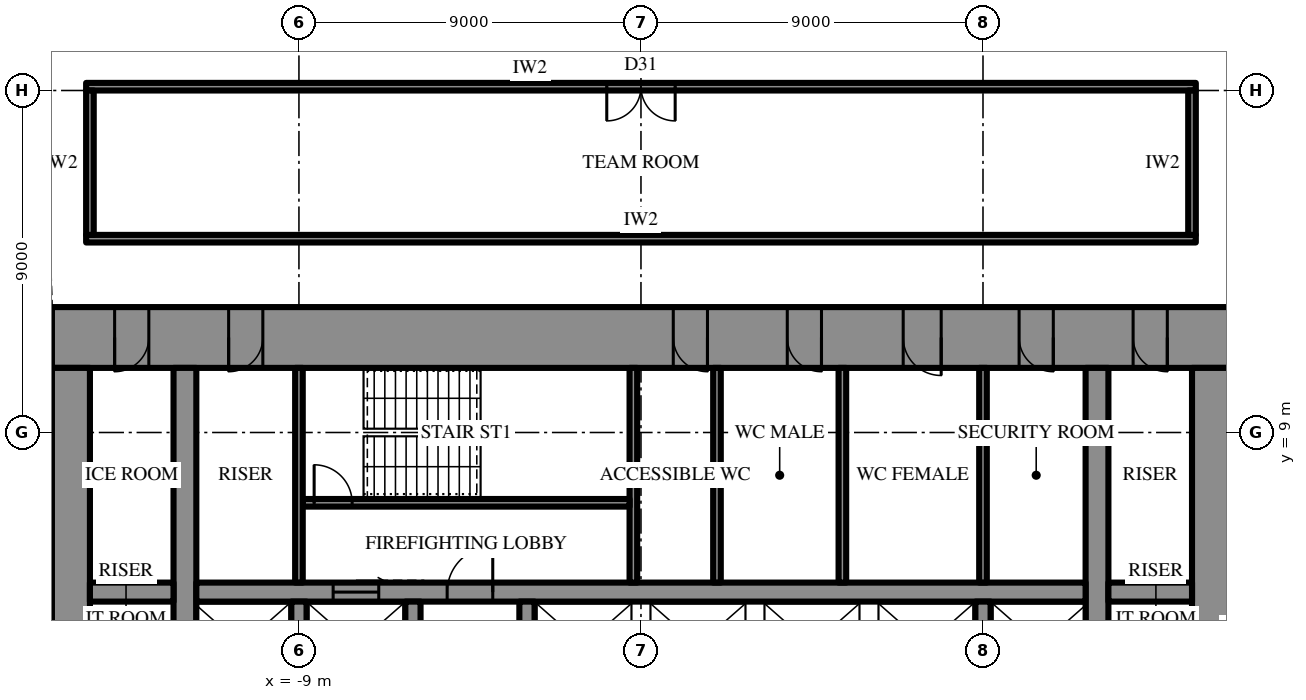
"""IFC4 building model, lengths in metres.
Left out: names, types, materials, properties, quantities, classifications, styles, units other than length and angle.
Written with IfcOpenShell. Run it as: python <this file> out.ifc"""

import sys

from ifc_helpers import new_model, si_unit, direction, frame, frame_2d, origin, place, context, subcontext, project, spatial, rectangle, extrude, element, fill, save


model = new_model("IFC4")
c1 = context("Model", 3, precision=1e-05, world=origin(), true_north=direction((0.0, 1.0)))
c2 = subcontext(c1, "Body", "Model", "MODEL_VIEW")
j1 = project(units=[si_unit("LENGTHUNIT", "METRE"), si_unit("PLANEANGLEUNIT", "RADIAN")], contexts=[c1])
p1 = place(None, origin())
s1 = spatial("IfcSite", under=j1, at=p1, CompositionType="ELEMENT")
p2 = place(p1, origin())
s2 = spatial("IfcBuilding", under=s1, at=p2, CompositionType="ELEMENT")
p3 = place(p2, frame((0.0, 0.0, 282.7)))
s3 = spatial("IfcBuildingStorey", under=s2, at=p3, CompositionType="ELEMENT", Elevation=282.7)
p4 = place(p3, frame((-15.5, 11.5, 0.0), z_axis=(0.0, 0.0, 1.0), x_axis=(1.0, 0.0, 0.0)))
e1 = element("IfcWall", 1, at=p4, inside=s3, PredefinedType="SHEAR", context=c2, shape_type="SweptSolid", body=[
    extrude(rectangle(XDim=31.0, YDim=1.6, at=frame_2d((15.5, 0.0))), origin(), (0.0, 0.0, 1.0), 4.2),
])
p5 = place(p4, frame((16.35, 0.0, 0.0)))
e2 = element("IfcOpeningElement", 2, at=p5, cuts=e1, PredefinedType="OPENING", context=c2, shape_type="SweptSolid", body=[
    extrude(rectangle(XDim=0.9, YDim=2.2, at=frame_2d((0.45, 1.1))), frame((0.0, 0.81, 0.0), z_axis=(0.0, -1.0, 0.0), x_axis=(1.0, 0.0, 0.0)), (0.0, 0.0, 1.0), 1.62),
])
p6 = place(p4, frame((19.35, 0.0, 0.0)))
e3 = element("IfcOpeningElement", 3, at=p6, cuts=e1, PredefinedType="OPENING", context=c2, shape_type="SweptSolid", body=[
    extrude(rectangle(XDim=0.9, YDim=2.2, at=frame_2d((0.45, 1.1))), frame((0.0, 0.81, 0.0), z_axis=(0.0, -1.0, 0.0), x_axis=(1.0, 0.0, 0.0)), (0.0, 0.0, 1.0), 1.62),
])
p7 = place(p4, frame((22.4, 0.0, 0.0)))
e4 = element("IfcOpeningElement", 4, at=p7, cuts=e1, PredefinedType="OPENING", context=c2, shape_type="SweptSolid", body=[
    extrude(rectangle(XDim=1.0, YDim=2.2, at=frame_2d((0.5, 1.1))), frame((0.0, 0.81, 0.0), z_axis=(0.0, -1.0, 0.0), x_axis=(1.0, 0.0, 0.0)), (0.0, 0.0, 1.0), 1.62),
])
p8 = place(p4, frame((1.65, 0.0, 0.0)))
e5 = element("IfcOpeningElement", 5, at=p8, cuts=e1, PredefinedType="OPENING", context=c2, shape_type="SweptSolid", body=[
    extrude(rectangle(XDim=0.9, YDim=2.2, at=frame_2d((0.45, 1.1))), frame((0.0, 0.81, 0.0), z_axis=(0.0, -1.0, 0.0), x_axis=(1.0, 0.0, 0.0)), (0.0, 0.0, 1.0), 1.62),
])
p9 = place(p4, frame((4.65, 0.0, 0.0)))
e6 = element("IfcOpeningElement", 6, at=p9, cuts=e1, PredefinedType="OPENING", context=c2, shape_type="SweptSolid", body=[
    extrude(rectangle(XDim=0.9, YDim=2.2, at=frame_2d((0.45, 1.1))), frame((0.0, 0.81, 0.0), z_axis=(0.0, -1.0, 0.0), x_axis=(1.0, 0.0, 0.0)), (0.0, 0.0, 1.0), 1.62),
])
p10 = place(p4, frame((25.45, 0.0, 0.0)))
e7 = element("IfcOpeningElement", 7, at=p10, cuts=e1, PredefinedType="OPENING", context=c2, shape_type="SweptSolid", body=[
    extrude(rectangle(XDim=0.9, YDim=2.2, at=frame_2d((0.45, 1.1))), frame((0.0, 0.81, 0.0), z_axis=(0.0, -1.0, 0.0), x_axis=(1.0, 0.0, 0.0)), (0.0, 0.0, 1.0), 1.62),
])
p11 = place(p4, frame((28.45, 0.0, 0.0)))
e8 = element("IfcOpeningElement", 8, at=p11, cuts=e1, PredefinedType="OPENING", context=c2, shape_type="SweptSolid", body=[
    extrude(rectangle(XDim=0.9, YDim=2.2, at=frame_2d((0.45, 1.1))), frame((0.0, 0.81, 0.0), z_axis=(0.0, -1.0, 0.0), x_axis=(1.0, 0.0, 0.0)), (0.0, 0.0, 1.0), 1.62),
])
p12 = place(p3, frame((15.0, -10.7, 0.0), z_axis=(0.0, 0.0, 1.0), x_axis=(0.0, 1.0, 0.0)))
e9 = element("IfcWall", 9, at=p12, inside=s3, PredefinedType="SHEAR", context=c2, shape_type="SweptSolid", body=[
    extrude(rectangle(XDim=21.4, YDim=1.0, at=frame_2d((10.7, 0.0))), origin(), (0.0, 0.0, 1.0), 4.2),
])
p13 = place(p12, frame((9.8, 0.0, 0.0)))
e10 = element("IfcOpeningElement", 10, at=p13, cuts=e9, PredefinedType="OPENING", context=c2, shape_type="SweptSolid", body=[
    extrude(rectangle(XDim=1.8, YDim=2.4, at=frame_2d((0.9, 1.2))), frame((0.0, 0.51, 0.0), z_axis=(0.0, -1.0, 0.0), x_axis=(1.0, 0.0, 0.0)), (0.0, 0.0, 1.0), 1.02),
])
p14 = place(p3, frame((-15.0, 10.7, 0.0), z_axis=(0.0, 0.0, 1.0), x_axis=(0.0, -1.0, 0.0)))
e11 = element("IfcWall", 11, at=p14, inside=s3, PredefinedType="SHEAR", context=c2, shape_type="SweptSolid", body=[
    extrude(rectangle(XDim=21.4, YDim=1.0, at=frame_2d((10.7, 0.0))), origin(), (0.0, 0.0, 1.0), 4.2),
])
p15 = place(p14, frame((9.8, 0.0, 0.0)))
e12 = element("IfcOpeningElement", 12, at=p15, cuts=e11, PredefinedType="OPENING", context=c2, shape_type="SweptSolid", body=[
    extrude(rectangle(XDim=1.8, YDim=2.4, at=frame_2d((0.9, 1.2))), frame((0.0, 0.51, 0.0), z_axis=(0.0, -1.0, 0.0), x_axis=(1.0, 0.0, 0.0)), (0.0, 0.0, 1.0), 1.02),
])
p16 = place(p3, frame((12.0, -10.7, 0.0), z_axis=(0.0, 0.0, 1.0), x_axis=(0.0, 1.0, 0.0)))
e13 = element("IfcWall", 13, at=p16, inside=s3, PredefinedType="SHEAR", context=c2, shape_type="SweptSolid", body=[
    extrude(rectangle(XDim=21.4, YDim=0.6, at=frame_2d((10.7, 0.0))), origin(), (0.0, 0.0, 1.0), 4.2),
])
p17 = place(p16, frame((9.8, 0.0, 0.0)))
e14 = element("IfcOpeningElement", 14, at=p17, cuts=e13, PredefinedType="OPENING", context=c2, shape_type="SweptSolid", body=[
    extrude(rectangle(XDim=1.8, YDim=2.4, at=frame_2d((0.9, 1.2))), frame((0.0, 0.31, 0.0), z_axis=(0.0, -1.0, 0.0), x_axis=(1.0, 0.0, 0.0)), (0.0, 0.0, 1.0), 0.62),
])
p18 = place(p3, frame((-12.0, -10.7, 0.0), z_axis=(0.0, 0.0, 1.0), x_axis=(0.0, 1.0, 0.0)))
e15 = element("IfcWall", 15, at=p18, inside=s3, PredefinedType="SHEAR", context=c2, shape_type="SweptSolid", body=[
    extrude(rectangle(XDim=21.4, YDim=0.6, at=frame_2d((10.7, 0.0))), origin(), (0.0, 0.0, 1.0), 4.2),
])
p19 = place(p18, frame((9.8, 0.0, 0.0)))
e16 = element("IfcOpeningElement", 16, at=p19, cuts=e15, PredefinedType="OPENING", context=c2, shape_type="SweptSolid", body=[
    extrude(rectangle(XDim=1.8, YDim=2.4, at=frame_2d((0.9, 1.2))), frame((0.0, 0.31, 0.0), z_axis=(0.0, -1.0, 0.0), x_axis=(1.0, 0.0, 0.0)), (0.0, 0.0, 1.0), 0.62),
])
p20 = place(p3, frame((-14.5, 4.8, 0.0), z_axis=(0.0, 0.0, 1.0), x_axis=(1.0, 0.0, 0.0)))
e17 = element("IfcWall", 17, at=p20, inside=s3, PredefinedType="SHEAR", context=c2, shape_type="SweptSolid", body=[
    extrude(rectangle(XDim=2.2, YDim=0.5, at=frame_2d((1.1, 0.0))), origin(), (0.0, 0.0, 1.0), 4.2),
])
p21 = place(p3, frame((-11.7, 4.8, 0.0), z_axis=(0.0, 0.0, 1.0), x_axis=(1.0, 0.0, 0.0)))
e18 = element("IfcWall", 18, at=p21, inside=s3, PredefinedType="SHEAR", context=c2, shape_type="SweptSolid", body=[
    extrude(rectangle(XDim=23.4, YDim=0.5, at=frame_2d((11.7, 0.0))), origin(), (0.0, 0.0, 1.0), 4.2),
])
p22 = place(p21, frame((6.6, 0.0, 0.0)))
e19 = element("IfcOpeningElement", 19, at=p22, cuts=e18, PredefinedType="OPENING", context=c2, shape_type="SweptSolid", body=[
    extrude(rectangle(XDim=1.2, YDim=2.2, at=frame_2d((0.6, 1.1))), frame((0.0, 0.26, 0.0), z_axis=(0.0, -1.0, 0.0), x_axis=(1.0, 0.0, 0.0)), (0.0, 0.0, 1.0), 0.52),
])
p23 = place(p21, frame((3.6, 0.0, 0.0)))
e20 = element("IfcOpeningElement", 20, at=p23, cuts=e18, PredefinedType="OPENING", context=c2, shape_type="SweptSolid", body=[
    extrude(rectangle(XDim=1.2, YDim=2.2, at=frame_2d((0.6, 1.1))), frame((0.0, 0.26, 0.0), z_axis=(0.0, -1.0, 0.0), x_axis=(1.0, 0.0, 0.0)), (0.0, 0.0, 1.0), 0.52),
])
p24 = place(p3, frame((12.3, 4.8, 0.0), z_axis=(0.0, 0.0, 1.0), x_axis=(1.0, 0.0, 0.0)))
e21 = element("IfcWall", 21, at=p24, inside=s3, PredefinedType="SHEAR", context=c2, shape_type="SweptSolid", body=[
    extrude(rectangle(XDim=2.2, YDim=0.5, at=frame_2d((1.1, 0.0))), origin(), (0.0, 0.0, 1.0), 4.2),
])
for number, where, z_axis, x_axis in (
    (22, (-9.0, 2.25, 0.0), (0.0, 0.0, 1.0), (0.0, 1.0, 0.0)),
    (23, (-6.0, 2.25, 0.0), (0.0, 0.0, 1.0), (0.0, 1.0, 0.0)),
    (24, (-3.0, 2.25, 0.0), (0.0, 0.0, 1.0), (0.0, 1.0, 0.0)),
    (25, (9.0, 2.25, 0.0), (0.0, 0.0, 1.0), (0.0, 1.0, 0.0)),
):
    element("IfcWall", number, at=place(p3, frame(where, z_axis=z_axis, x_axis=x_axis)), inside=s3, PredefinedType="SHEAR", context=c2, shape_type="SweptSolid", body=[
        extrude(rectangle(XDim=2.3, YDim=0.4, at=frame_2d((1.15, 0.0))), origin(), (0.0, 0.0, 1.0), 4.2),
    ])
p25 = place(p3, frame((-0.2, 5.05, 0.0), z_axis=(0.0, 0.0, 1.0), x_axis=(0.0, 1.0, 0.0)))
e26 = element("IfcWall", 26, at=p25, inside=s3, PredefinedType="SHEAR", context=c2, shape_type="SweptSolid", body=[
    extrude(rectangle(XDim=5.65, YDim=0.2, at=frame_2d((2.825, 0.0))), origin(), (0.0, 0.0, 1.0), 4.2),
])
p26 = place(p3, frame((-8.9, 7.15, 0.0), z_axis=(0.0, 0.0, 1.0), x_axis=(1.0, 0.0, 0.0)))
e27 = element("IfcWall", 27, at=p26, inside=s3, PredefinedType="SHEAR", context=c2, shape_type="SweptSolid", body=[
    extrude(rectangle(XDim=8.6, YDim=0.2, at=frame_2d((4.3, 0.0))), origin(), (0.0, 0.0, 1.0), 4.2),
])
p27 = place(p26, frame((0.3, 0.0, 0.0)))
e28 = element("IfcOpeningElement", 28, at=p27, cuts=e27, PredefinedType="OPENING", context=c2, shape_type="SweptSolid", body=[
    extrude(rectangle(XDim=1.0, YDim=2.2, at=frame_2d((0.5, 1.1))), frame((0.0, 0.11, 0.0), z_axis=(0.0, -1.0, 0.0), x_axis=(1.0, 0.0, 0.0)), (0.0, 0.0, 1.0), 0.22),
])
for number, where, z_axis, x_axis in (
    (29, (-9.0, 5.05, 0.0), (0.0, 0.0, 1.0), (0.0, 1.0, 0.0)),
    (30, (9.0, 5.05, 0.0), (0.0, 0.0, 1.0), (0.0, 1.0, 0.0)),
    (31, (2.0, 5.05, 0.0), (0.0, 0.0, 1.0), (0.0, 1.0, 0.0)),
    (32, (5.3, 5.05, 0.0), (0.0, 0.0, 1.0), (0.0, 1.0, 0.0)),
):
    element("IfcWall", number, at=place(p3, frame(where, z_axis=z_axis, x_axis=x_axis)), inside=s3, PredefinedType="PARTITIONING", context=c2, shape_type="SweptSolid", body=[
        extrude(rectangle(XDim=5.65, YDim=0.2, at=frame_2d((2.825, 0.0))), origin(), (0.0, 0.0, 1.0), 4.0),
    ])
p28 = place(p3, frame((-14.6, 14.1, 0.0), z_axis=(0.0, 0.0, 1.0), x_axis=(1.0, 0.0, 0.0)))
e33 = element("IfcWall", 33, at=p28, inside=s3, PredefinedType="PARTITIONING", context=c2, shape_type="SweptSolid", body=[
    extrude(rectangle(XDim=29.2, YDim=0.2, at=frame_2d((14.6, 0.0))), origin(), (0.0, 0.0, 1.0), 4.0),
])
p29 = place(p3, frame((-14.6, 18.1, 0.0), z_axis=(0.0, 0.0, 1.0), x_axis=(1.0, 0.0, 0.0)))
e34 = element("IfcWall", 34, at=p29, inside=s3, PredefinedType="PARTITIONING", context=c2, shape_type="SweptSolid", body=[
    extrude(rectangle(XDim=29.2, YDim=0.2, at=frame_2d((14.6, 0.0))), origin(), (0.0, 0.0, 1.0), 4.0),
])
p30 = place(p29, frame((13.7, 0.0, 0.0)))
e35 = element("IfcOpeningElement", 35, at=p30, cuts=e34, PredefinedType="OPENING", context=c2, shape_type="SweptSolid", body=[
    extrude(rectangle(XDim=1.8, YDim=2.4, at=frame_2d((0.9, 1.2))), frame((0.0, 0.11, 0.0), z_axis=(0.0, -1.0, 0.0), x_axis=(1.0, 0.0, 0.0)), (0.0, 0.0, 1.0), 0.22),
])
for number, where, z_axis, x_axis in (
    (36, (-14.5, 14.2, 0.0), (0.0, 0.0, 1.0), (0.0, 1.0, 0.0)),
    (37, (14.5, 14.2, 0.0), (0.0, 0.0, 1.0), (0.0, 1.0, 0.0)),
):
    element("IfcWall", number, at=place(p3, frame(where, z_axis=z_axis, x_axis=x_axis)), inside=s3, PredefinedType="PARTITIONING", context=c2, shape_type="SweptSolid", body=[
        extrude(rectangle(XDim=3.8, YDim=0.2, at=frame_2d((1.9, 0.0))), origin(), (0.0, 0.0, 1.0), 4.0),
    ])
p31 = place(p22, origin())
e38 = element("IfcDoor", 38, at=p31, inside=s3, OperationType="SINGLE_SWING_LEFT", PredefinedType="DOOR", context=c2, shape_type="SweptSolid", body=[
    extrude(rectangle(XDim=1.2, YDim=2.2, at=frame_2d((0.6, 1.1))), frame((0.0, 0.025, 0.0), z_axis=(0.0, -1.0, 0.0), x_axis=(1.0, 0.0, 0.0)), (0.0, 0.0, 1.0), 0.05),
])
fill(e19, e38)
p32 = place(p27, origin())
e39 = element("IfcDoor", 39, at=p32, inside=s3, OperationType="SINGLE_SWING_RIGHT", PredefinedType="DOOR", context=c2, shape_type="SweptSolid", body=[
    extrude(rectangle(XDim=1.0, YDim=2.2, at=frame_2d((0.5, 1.1))), frame((0.0, 0.025, 0.0), z_axis=(0.0, -1.0, 0.0), x_axis=(1.0, 0.0, 0.0)), (0.0, 0.0, 1.0), 0.05),
])
fill(e28, e39)
p33 = place(p5, frame((0.9, 0.0, 0.0), z_axis=(0.0, 0.0, 1.0), x_axis=(-1.0, 0.0, 0.0)))
e40 = element("IfcDoor", 40, at=p33, inside=s3, OperationType="SINGLE_SWING_RIGHT", PredefinedType="DOOR", context=c2, shape_type="SweptSolid", body=[
    extrude(rectangle(XDim=0.9, YDim=2.2, at=frame_2d((0.45, 1.1))), frame((0.0, 0.025, 0.0), z_axis=(0.0, -1.0, 0.0), x_axis=(1.0, 0.0, 0.0)), (0.0, 0.0, 1.0), 0.05),
])
fill(e2, e40)
p34 = place(p6, frame((0.9, 0.0, 0.0), z_axis=(0.0, 0.0, 1.0), x_axis=(-1.0, 0.0, 0.0)))
e41 = element("IfcDoor", 41, at=p34, inside=s3, OperationType="SINGLE_SWING_RIGHT", PredefinedType="DOOR", context=c2, shape_type="SweptSolid", body=[
    extrude(rectangle(XDim=0.9, YDim=2.2, at=frame_2d((0.45, 1.1))), frame((0.0, 0.025, 0.0), z_axis=(0.0, -1.0, 0.0), x_axis=(1.0, 0.0, 0.0)), (0.0, 0.0, 1.0), 0.05),
])
fill(e3, e41)
p35 = place(p7, frame((1.0, 0.0, 0.0), z_axis=(0.0, 0.0, 1.0), x_axis=(-1.0, 0.0, 0.0)))
e42 = element("IfcDoor", 42, at=p35, inside=s3, OperationType="SINGLE_SWING_RIGHT", PredefinedType="DOOR", context=c2, shape_type="SweptSolid", body=[
    extrude(rectangle(XDim=1.0, YDim=2.2, at=frame_2d((0.5, 1.1))), frame((0.0, 0.025, 0.0), z_axis=(0.0, -1.0, 0.0), x_axis=(1.0, 0.0, 0.0)), (0.0, 0.0, 1.0), 0.05),
])
fill(e4, e42)
p36 = place(p8, frame((0.9, 0.0, 0.0), z_axis=(0.0, 0.0, 1.0), x_axis=(-1.0, 0.0, 0.0)))
e43 = element("IfcDoor", 43, at=p36, inside=s3, OperationType="SINGLE_SWING_LEFT", PredefinedType="DOOR", context=c2, shape_type="SweptSolid", body=[
    extrude(rectangle(XDim=0.9, YDim=2.2, at=frame_2d((0.45, 1.1))), frame((0.0, 0.025, 0.0), z_axis=(0.0, -1.0, 0.0), x_axis=(1.0, 0.0, 0.0)), (0.0, 0.0, 1.0), 0.05),
])
fill(e5, e43)
p37 = place(p9, frame((0.9, 0.0, 0.0), z_axis=(0.0, 0.0, 1.0), x_axis=(-1.0, 0.0, 0.0)))
e44 = element("IfcDoor", 44, at=p37, inside=s3, OperationType="SINGLE_SWING_LEFT", PredefinedType="DOOR", context=c2, shape_type="SweptSolid", body=[
    extrude(rectangle(XDim=0.9, YDim=2.2, at=frame_2d((0.45, 1.1))), frame((0.0, 0.025, 0.0), z_axis=(0.0, -1.0, 0.0), x_axis=(1.0, 0.0, 0.0)), (0.0, 0.0, 1.0), 0.05),
])
fill(e6, e44)
p38 = place(p10, frame((0.9, 0.0, 0.0), z_axis=(0.0, 0.0, 1.0), x_axis=(-1.0, 0.0, 0.0)))
e45 = element("IfcDoor", 45, at=p38, inside=s3, OperationType="SINGLE_SWING_RIGHT", PredefinedType="DOOR", context=c2, shape_type="SweptSolid", body=[
    extrude(rectangle(XDim=0.9, YDim=2.2, at=frame_2d((0.45, 1.1))), frame((0.0, 0.025, 0.0), z_axis=(0.0, -1.0, 0.0), x_axis=(1.0, 0.0, 0.0)), (0.0, 0.0, 1.0), 0.05),
])
fill(e7, e45)
p39 = place(p11, frame((0.9, 0.0, 0.0), z_axis=(0.0, 0.0, 1.0), x_axis=(-1.0, 0.0, 0.0)))
e46 = element("IfcDoor", 46, at=p39, inside=s3, OperationType="SINGLE_SWING_RIGHT", PredefinedType="DOOR", context=c2, shape_type="SweptSolid", body=[
    extrude(rectangle(XDim=0.9, YDim=2.2, at=frame_2d((0.45, 1.1))), frame((0.0, 0.025, 0.0), z_axis=(0.0, -1.0, 0.0), x_axis=(1.0, 0.0, 0.0)), (0.0, 0.0, 1.0), 0.05),
])
fill(e8, e46)
p40 = place(p23, origin())
e47 = element("IfcDoor", 47, at=p40, inside=s3, OperationType="SLIDING_TO_LEFT", PredefinedType="DOOR", context=c2, shape_type="SweptSolid", body=[
    extrude(rectangle(XDim=1.2, YDim=2.2, at=frame_2d((0.6, 1.1))), frame((0.0, 0.025, 0.0), z_axis=(0.0, -1.0, 0.0), x_axis=(1.0, 0.0, 0.0)), (0.0, 0.0, 1.0), 0.05),
])
fill(e20, e47)
p41 = place(p30, frame((1.8, 0.0, 0.0), z_axis=(0.0, 0.0, 1.0), x_axis=(-1.0, 0.0, 0.0)))
e48 = element("IfcDoor", 48, at=p41, inside=s3, OperationType="DOUBLE_DOOR_SINGLE_SWING", PredefinedType="DOOR", context=c2, shape_type="SweptSolid", body=[
    extrude(rectangle(XDim=1.8, YDim=2.4, at=frame_2d((0.9, 1.2))), frame((0.0, 0.025, 0.0), z_axis=(0.0, -1.0, 0.0), x_axis=(1.0, 0.0, 0.0)), (0.0, 0.0, 1.0), 0.05),
])
fill(e35, e48)
save(model, sys.argv[1])
